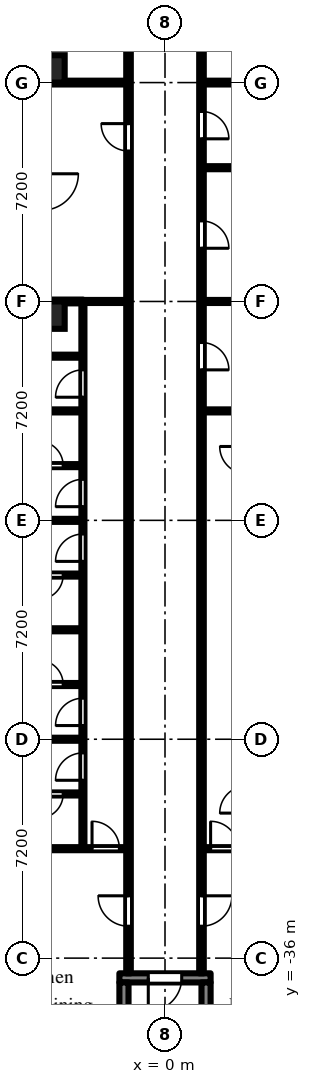
"""IFC4 building model, lengths in metres.
Left out: names, types, materials, properties, quantities, classifications, styles, units other than length and angle.
Written with IfcOpenShell. Run it as: python <this file> out.ifc"""

import sys

from ifc_helpers import new_model, si_unit, direction, frame, frame_2d, origin, origin_2d, place, context, subcontext, project, spatial, rectangle, extrude, element, fill, save


model = new_model("IFC4")
c1 = context("Model", 3, precision=1e-05, world=origin(), true_north=direction((0.0, 1.0)))
c2 = subcontext(c1, "Body", "Model", "MODEL_VIEW")
j1 = project(units=[si_unit("LENGTHUNIT", "METRE"), si_unit("PLANEANGLEUNIT", "RADIAN")], contexts=[c1])
p1 = place(None, origin())
s1 = spatial("IfcSite", under=j1, at=p1, CompositionType="ELEMENT")
p2 = place(p1, origin())
s2 = spatial("IfcBuilding", under=s1, at=p2, CompositionType="ELEMENT")
p3 = place(p2, frame((0.0, 0.0, 11.7)))
s3 = spatial("IfcBuildingStorey", under=s2, at=p3, CompositionType="ELEMENT", Elevation=11.7)
for number, where, z_axis, x_axis in (
    (1, (-3.75, -14.85, 0.0), (0.0, 0.0, 1.0), (1.0, 0.0, 0.0)),
    (2, (-3.75, -6.75, 0.0), (0.0, 0.0, 1.0), (1.0, 0.0, 0.0)),
):
    element("IfcColumn", number, at=place(p3, frame(where, z_axis=z_axis, x_axis=x_axis)), inside=s3, PredefinedType="COLUMN", context=c2, shape_type="SweptSolid", body=[
        extrude(rectangle(XDim=0.9, YDim=0.9, at=origin_2d()), origin(), (0.0, 0.0, 1.0), 3.0),
    ])
p4 = place(p3, frame((-1.5, -36.65, 0.0), z_axis=(0.0, 0.0, 1.0), x_axis=(1.0, 0.0, 0.0)))
e3 = element("IfcWall", 3, at=p4, inside=s3, PredefinedType="SHEAR", context=c2, shape_type="SweptSolid", body=[
    extrude(rectangle(XDim=3.0, YDim=0.3, at=frame_2d((1.5, 0.0))), origin(), (0.0, 0.0, 1.0), 2.575),
])
p5 = place(p4, frame((0.95, 0.0, 0.0)))
e4 = element("IfcOpeningElement", 4, at=p5, cuts=e3, PredefinedType="OPENING", context=c2, shape_type="SweptSolid", body=[
    extrude(rectangle(XDim=1.1, YDim=2.1, at=frame_2d((0.55, 1.05))), frame((0.0, 0.16, 0.0), z_axis=(0.0, -1.0, 0.0), x_axis=(1.0, 0.0, 0.0)), (0.0, 0.0, 1.0), 0.32),
])
for number, where, z_axis, x_axis in (
    (5, (-1.35, -36.8, 0.0), (0.0, 0.0, 1.0), (0.0, -1.0, 0.0)),
    (6, (1.35, -36.8, 0.0), (0.0, 0.0, 1.0), (0.0, -1.0, 0.0)),
):
    element("IfcWall", number, at=place(p3, frame(where, z_axis=z_axis, x_axis=x_axis)), inside=s3, PredefinedType="SHEAR", context=c2, shape_type="SweptSolid", body=[
        extrude(rectangle(XDim=5.8, YDim=0.3, at=frame_2d((2.9, 0.0))), origin(), (0.0, 0.0, 1.0), 2.575),
    ])
p6 = place(p3, frame((-6.9, -32.4, 0.0), z_axis=(0.0, 0.0, 1.0), x_axis=(1.0, 0.0, 0.0)))
e7 = element("IfcWall", 7, at=p6, inside=s3, PredefinedType="PARTITIONING", context=c2, shape_type="SweptSolid", body=[
    extrude(rectangle(XDim=5.625, YDim=0.1, at=frame_2d((2.812, 0.0))), origin(), (0.0, 0.0, 1.0), 2.575),
])
p7 = place(p6, frame((4.5, 0.0, 0.0)))
e8 = element("IfcOpeningElement", 8, at=p7, cuts=e7, PredefinedType="OPENING", context=c2, shape_type="SweptSolid", body=[
    extrude(rectangle(XDim=0.9, YDim=2.1, at=frame_2d((0.45, 1.05))), frame((0.0, 0.06, 0.0), z_axis=(0.0, -1.0, 0.0), x_axis=(1.0, 0.0, 0.0)), (0.0, 0.0, 1.0), 0.12),
])
for number, where, z_axis, x_axis in (
    (9, (-6.9, -28.8, 0.0), (0.0, 0.0, 1.0), (1.0, 0.0, 0.0)),
    (10, (-6.9, -25.2, 0.0), (0.0, 0.0, 1.0), (1.0, 0.0, 0.0)),
    (11, (-6.9, -21.6, 0.0), (0.0, 0.0, 1.0), (1.0, 0.0, 0.0)),
    (12, (-6.9, -18.0, 0.0), (0.0, 0.0, 1.0), (1.0, 0.0, 0.0)),
):
    element("IfcWall", number, at=place(p3, frame(where, z_axis=z_axis, x_axis=x_axis)), inside=s3, PredefinedType="PARTITIONING", context=c2, shape_type="SweptSolid", body=[
        extrude(rectangle(XDim=4.15, YDim=0.1, at=frame_2d((2.075, 0.0))), origin(), (0.0, 0.0, 1.0), 2.575),
    ])
p8 = place(p3, frame((-4.75, -30.6, 0.0), z_axis=(0.0, 0.0, 1.0), x_axis=(1.0, 0.0, 0.0)))
e13 = element("IfcWall", 13, at=p8, inside=s3, PredefinedType="PARTITIONING", context=c2, shape_type="SweptSolid", body=[
    extrude(rectangle(XDim=2.0, YDim=0.1, at=frame_2d((1.0, 0.0))), origin(), (0.0, 0.0, 1.0), 2.575),
])
p9 = place(p8, frame((0.6, 0.0, 0.0)))
e14 = element("IfcOpeningElement", 14, at=p9, cuts=e13, PredefinedType="OPENING", context=c2, shape_type="SweptSolid", body=[
    extrude(rectangle(XDim=0.8, YDim=2.1, at=frame_2d((0.4, 1.05))), frame((0.0, 0.06, 0.0), z_axis=(0.0, -1.0, 0.0), x_axis=(1.0, 0.0, 0.0)), (0.0, 0.0, 1.0), 0.12),
])
p10 = place(p3, frame((-4.75, -27.0, 0.0), z_axis=(0.0, 0.0, 1.0), x_axis=(1.0, 0.0, 0.0)))
e15 = element("IfcWall", 15, at=p10, inside=s3, PredefinedType="PARTITIONING", context=c2, shape_type="SweptSolid", body=[
    extrude(rectangle(XDim=2.0, YDim=0.1, at=frame_2d((1.0, 0.0))), origin(), (0.0, 0.0, 1.0), 2.575),
])
p11 = place(p10, frame((0.6, 0.0, 0.0)))
e16 = element("IfcOpeningElement", 16, at=p11, cuts=e15, PredefinedType="OPENING", context=c2, shape_type="SweptSolid", body=[
    extrude(rectangle(XDim=0.8, YDim=2.1, at=frame_2d((0.4, 1.05))), frame((0.0, 0.06, 0.0), z_axis=(0.0, -1.0, 0.0), x_axis=(1.0, 0.0, 0.0)), (0.0, 0.0, 1.0), 0.12),
])
p12 = place(p3, frame((-4.75, -23.4, 0.0), z_axis=(0.0, 0.0, 1.0), x_axis=(1.0, 0.0, 0.0)))
e17 = element("IfcWall", 17, at=p12, inside=s3, PredefinedType="PARTITIONING", context=c2, shape_type="SweptSolid", body=[
    extrude(rectangle(XDim=2.0, YDim=0.1, at=frame_2d((1.0, 0.0))), origin(), (0.0, 0.0, 1.0), 2.575),
])
p13 = place(p12, frame((0.6, 0.0, 0.0)))
e18 = element("IfcOpeningElement", 18, at=p13, cuts=e17, PredefinedType="OPENING", context=c2, shape_type="SweptSolid", body=[
    extrude(rectangle(XDim=0.8, YDim=2.1, at=frame_2d((0.4, 1.05))), frame((0.0, 0.06, 0.0), z_axis=(0.0, -1.0, 0.0), x_axis=(1.0, 0.0, 0.0)), (0.0, 0.0, 1.0), 0.12),
])
p14 = place(p3, frame((-4.75, -19.8, 0.0), z_axis=(0.0, 0.0, 1.0), x_axis=(1.0, 0.0, 0.0)))
e19 = element("IfcWall", 19, at=p14, inside=s3, PredefinedType="PARTITIONING", context=c2, shape_type="SweptSolid", body=[
    extrude(rectangle(XDim=2.0, YDim=0.1, at=frame_2d((1.0, 0.0))), origin(), (0.0, 0.0, 1.0), 2.575),
])
p15 = place(p14, frame((0.6, 0.0, 0.0)))
e20 = element("IfcOpeningElement", 20, at=p15, cuts=e19, PredefinedType="OPENING", context=c2, shape_type="SweptSolid", body=[
    extrude(rectangle(XDim=0.8, YDim=2.1, at=frame_2d((0.4, 1.05))), frame((0.0, 0.06, 0.0), z_axis=(0.0, -1.0, 0.0), x_axis=(1.0, 0.0, 0.0)), (0.0, 0.0, 1.0), 0.12),
])
p16 = place(p3, frame((-4.75, -16.2, 0.0), z_axis=(0.0, 0.0, 1.0), x_axis=(1.0, 0.0, 0.0)))
e21 = element("IfcWall", 21, at=p16, inside=s3, PredefinedType="PARTITIONING", context=c2, shape_type="SweptSolid", body=[
    extrude(rectangle(XDim=2.0, YDim=0.1, at=frame_2d((1.0, 0.0))), origin(), (0.0, 0.0, 1.0), 2.575),
])
p17 = place(p3, frame((-3.9, -14.4, 0.0), z_axis=(0.0, 0.0, 1.0), x_axis=(1.0, 0.0, 0.0)))
e22 = element("IfcWall", 22, at=p17, inside=s3, PredefinedType="PARTITIONING", context=c2, shape_type="SweptSolid", body=[
    extrude(rectangle(XDim=1.2, YDim=0.125, at=frame_2d((0.6, 0.0))), origin(), (0.0, 0.0, 1.0), 2.575),
])
p18 = place(p3, frame((-3.9, -7.2, 0.0), z_axis=(0.0, 0.0, 1.0), x_axis=(1.0, 0.0, 0.0)))
e23 = element("IfcWall", 23, at=p18, inside=s3, PredefinedType="PARTITIONING", context=c2, shape_type="SweptSolid", body=[
    extrude(rectangle(XDim=2.625, YDim=0.125, at=frame_2d((1.312, 0.0))), origin(), (0.0, 0.0, 1.0), 2.575),
])
p19 = place(p3, frame((-2.7, -32.35, 0.0), z_axis=(0.0, 0.0, 1.0), x_axis=(0.0, 1.0, 0.0)))
e24 = element("IfcWall", 24, at=p19, inside=s3, PredefinedType="PARTITIONING", context=c2, shape_type="SweptSolid", body=[
    extrude(rectangle(XDim=17.888, YDim=0.1, at=frame_2d((8.944, 0.0))), origin(), (0.0, 0.0, 1.0), 2.575),
])
p20 = place(p19, frame((2.2, 0.0, 0.0)))
e25 = element("IfcOpeningElement", 25, at=p20, cuts=e24, PredefinedType="OPENING", context=c2, shape_type="SweptSolid", body=[
    extrude(rectangle(XDim=0.9, YDim=2.1, at=frame_2d((0.45, 1.05))), frame((0.0, 0.06, 0.0), z_axis=(0.0, -1.0, 0.0), x_axis=(1.0, 0.0, 0.0)), (0.0, 0.0, 1.0), 0.12),
])
p21 = place(p19, frame((4.0, 0.0, 0.0)))
e26 = element("IfcOpeningElement", 26, at=p21, cuts=e24, PredefinedType="OPENING", context=c2, shape_type="SweptSolid", body=[
    extrude(rectangle(XDim=0.9, YDim=2.1, at=frame_2d((0.45, 1.05))), frame((0.0, 0.06, 0.0), z_axis=(0.0, -1.0, 0.0), x_axis=(1.0, 0.0, 0.0)), (0.0, 0.0, 1.0), 0.12),
])
p22 = place(p19, frame((9.4, 0.0, 0.0)))
e27 = element("IfcOpeningElement", 27, at=p22, cuts=e24, PredefinedType="OPENING", context=c2, shape_type="SweptSolid", body=[
    extrude(rectangle(XDim=0.9, YDim=2.1, at=frame_2d((0.45, 1.05))), frame((0.0, 0.06, 0.0), z_axis=(0.0, -1.0, 0.0), x_axis=(1.0, 0.0, 0.0)), (0.0, 0.0, 1.0), 0.12),
])
p23 = place(p19, frame((11.2, 0.0, 0.0)))
e28 = element("IfcOpeningElement", 28, at=p23, cuts=e24, PredefinedType="OPENING", context=c2, shape_type="SweptSolid", body=[
    extrude(rectangle(XDim=0.9, YDim=2.1, at=frame_2d((0.45, 1.05))), frame((0.0, 0.06, 0.0), z_axis=(0.0, -1.0, 0.0), x_axis=(1.0, 0.0, 0.0)), (0.0, 0.0, 1.0), 0.12),
])
p24 = place(p19, frame((14.8, 0.0, 0.0)))
e29 = element("IfcOpeningElement", 29, at=p24, cuts=e24, PredefinedType="OPENING", context=c2, shape_type="SweptSolid", body=[
    extrude(rectangle(XDim=0.9, YDim=2.1, at=frame_2d((0.45, 1.05))), frame((0.0, 0.06, 0.0), z_axis=(0.0, -1.0, 0.0), x_axis=(1.0, 0.0, 0.0)), (0.0, 0.0, 1.0), 0.12),
])
p25 = place(p3, frame((-2.7, -14.4, 0.0), z_axis=(0.0, 0.0, 1.0), x_axis=(1.0, 0.0, 0.0)))
e30 = element("IfcWall", 30, at=p25, inside=s3, PredefinedType="PARTITIONING", context=c2, shape_type="SweptSolid", body=[
    extrude(rectangle(XDim=1.425, YDim=0.1, at=frame_2d((0.712, 0.0))), origin(), (0.0, 0.0, 1.0), 2.575),
])
p26 = place(p3, frame((-1.2, -36.5, 0.0), z_axis=(0.0, 0.0, 1.0), x_axis=(0.0, 1.0, 0.0)))
e31 = element("IfcWall", 31, at=p26, inside=s3, PredefinedType="PARTITIONING", context=c2, shape_type="SweptSolid", body=[
    extrude(rectangle(XDim=35.375, YDim=0.15, at=frame_2d((17.688, 0.0))), origin(), (0.0, 0.0, 1.0), 2.575),
])
p27 = place(p26, frame((31.85, 0.0, 0.0)))
e32 = element("IfcOpeningElement", 32, at=p27, cuts=e31, PredefinedType="OPENING", context=c2, shape_type="SweptSolid", body=[
    extrude(rectangle(XDim=0.9, YDim=2.1, at=frame_2d((0.45, 1.05))), frame((0.0, 0.085, 0.0), z_axis=(0.0, -1.0, 0.0), x_axis=(1.0, 0.0, 0.0)), (0.0, 0.0, 1.0), 0.17),
])
p28 = place(p26, frame((27.05, 0.0, 0.0)))
e33 = element("IfcOpeningElement", 33, at=p28, cuts=e31, PredefinedType="OPENING", context=c2, shape_type="SweptSolid", body=[
    extrude(rectangle(XDim=0.9, YDim=2.1, at=frame_2d((0.45, 1.05))), frame((0.0, 0.085, 0.0), z_axis=(0.0, -1.0, 0.0), x_axis=(1.0, 0.0, 0.0)), (0.0, 0.0, 1.0), 0.17),
])
p29 = place(p26, frame((1.55, 0.0, 0.0)))
e34 = element("IfcOpeningElement", 34, at=p29, cuts=e31, PredefinedType="OPENING", context=c2, shape_type="SweptSolid", body=[
    extrude(rectangle(XDim=1.0, YDim=2.1, at=frame_2d((0.5, 1.05))), frame((0.0, 0.085, 0.0), z_axis=(0.0, -1.0, 0.0), x_axis=(1.0, 0.0, 0.0)), (0.0, 0.0, 1.0), 0.17),
])
p30 = place(p3, frame((1.2, -36.5, 0.0), z_axis=(0.0, 0.0, 1.0), x_axis=(0.0, 1.0, 0.0)))
e35 = element("IfcWall", 35, at=p30, inside=s3, PredefinedType="PARTITIONING", context=c2, shape_type="SweptSolid", body=[
    extrude(rectangle(XDim=35.375, YDim=0.15, at=frame_2d((17.688, 0.0))), origin(), (0.0, 0.0, 1.0), 2.575),
])
p31 = place(p30, frame((33.65, 0.0, 0.0)))
e36 = element("IfcOpeningElement", 36, at=p31, cuts=e35, PredefinedType="OPENING", context=c2, shape_type="SweptSolid", body=[
    extrude(rectangle(XDim=0.9, YDim=2.1, at=frame_2d((0.45, 1.05))), frame((0.0, 0.085, 0.0), z_axis=(0.0, -1.0, 0.0), x_axis=(1.0, 0.0, 0.0)), (0.0, 0.0, 1.0), 0.17),
])
p32 = place(p30, frame((30.65, 0.0, 0.0)))
e37 = element("IfcOpeningElement", 37, at=p32, cuts=e35, PredefinedType="OPENING", context=c2, shape_type="SweptSolid", body=[
    extrude(rectangle(XDim=0.9, YDim=2.1, at=frame_2d((0.45, 1.05))), frame((0.0, 0.085, 0.0), z_axis=(0.0, -1.0, 0.0), x_axis=(1.0, 0.0, 0.0)), (0.0, 0.0, 1.0), 0.17),
])
p33 = place(p30, frame((27.45, 0.0, 0.0)))
e38 = element("IfcOpeningElement", 38, at=p33, cuts=e35, PredefinedType="OPENING", context=c2, shape_type="SweptSolid", body=[
    extrude(rectangle(XDim=0.9, YDim=2.1, at=frame_2d((0.45, 1.05))), frame((0.0, 0.085, 0.0), z_axis=(0.0, -1.0, 0.0), x_axis=(1.0, 0.0, 0.0)), (0.0, 0.0, 1.0), 0.17),
])
p34 = place(p30, frame((23.85, 0.0, 0.0)))
e39 = element("IfcOpeningElement", 39, at=p34, cuts=e35, PredefinedType="OPENING", context=c2, shape_type="SweptSolid", body=[
    extrude(rectangle(XDim=0.9, YDim=2.1, at=frame_2d((0.45, 1.05))), frame((0.0, 0.085, 0.0), z_axis=(0.0, -1.0, 0.0), x_axis=(1.0, 0.0, 0.0)), (0.0, 0.0, 1.0), 0.17),
])
p35 = place(p30, frame((19.85, 0.0, 0.0)))
e40 = element("IfcOpeningElement", 40, at=p35, cuts=e35, PredefinedType="OPENING", context=c2, shape_type="SweptSolid", body=[
    extrude(rectangle(XDim=0.9, YDim=2.1, at=frame_2d((0.45, 1.05))), frame((0.0, 0.085, 0.0), z_axis=(0.0, -1.0, 0.0), x_axis=(1.0, 0.0, 0.0)), (0.0, 0.0, 1.0), 0.17),
])
p36 = place(p30, frame((1.55, 0.0, 0.0)))
e41 = element("IfcOpeningElement", 41, at=p36, cuts=e35, PredefinedType="OPENING", context=c2, shape_type="SweptSolid", body=[
    extrude(rectangle(XDim=1.0, YDim=2.1, at=frame_2d((0.5, 1.05))), frame((0.0, 0.085, 0.0), z_axis=(0.0, -1.0, 0.0), x_axis=(1.0, 0.0, 0.0)), (0.0, 0.0, 1.0), 0.17),
])
p37 = place(p3, frame((1.275, -32.4, 0.0), z_axis=(0.0, 0.0, 1.0), x_axis=(1.0, 0.0, 0.0)))
e42 = element("IfcWall", 42, at=p37, inside=s3, PredefinedType="PARTITIONING", context=c2, shape_type="SweptSolid", body=[
    extrude(rectangle(XDim=5.625, YDim=0.1, at=frame_2d((2.812, 0.0))), origin(), (0.0, 0.0, 1.0), 2.575),
])
p38 = place(p37, frame((0.225, 0.0, 0.0)))
e43 = element("IfcOpeningElement", 43, at=p38, cuts=e42, PredefinedType="OPENING", context=c2, shape_type="SweptSolid", body=[
    extrude(rectangle(XDim=0.9, YDim=2.1, at=frame_2d((0.45, 1.05))), frame((0.0, 0.06, 0.0), z_axis=(0.0, -1.0, 0.0), x_axis=(1.0, 0.0, 0.0)), (0.0, 0.0, 1.0), 0.12),
])
p39 = place(p3, frame((1.275, -18.0, 0.0), z_axis=(0.0, 0.0, 1.0), x_axis=(1.0, 0.0, 0.0)))
e44 = element("IfcWall", 44, at=p39, inside=s3, PredefinedType="PARTITIONING", context=c2, shape_type="SweptSolid", body=[
    extrude(rectangle(XDim=5.625, YDim=0.1, at=frame_2d((2.812, 0.0))), origin(), (0.0, 0.0, 1.0), 2.575),
])
for number, where, z_axis, x_axis in (
    (45, (1.275, -14.4, 0.0), (0.0, 0.0, 1.0), (1.0, 0.0, 0.0)),
    (46, (1.275, -10.0, 0.0), (0.0, 0.0, 1.0), (1.0, 0.0, 0.0)),
):
    element("IfcWall", number, at=place(p3, frame(where, z_axis=z_axis, x_axis=x_axis)), inside=s3, PredefinedType="PARTITIONING", context=c2, shape_type="SweptSolid", body=[
        extrude(rectangle(XDim=2.625, YDim=0.1, at=frame_2d((1.312, 0.0))), origin(), (0.0, 0.0, 1.0), 2.575),
    ])
p40 = place(p3, frame((1.275, -7.2, 0.0), z_axis=(0.0, 0.0, 1.0), x_axis=(1.0, 0.0, 0.0)))
e47 = element("IfcWall", 47, at=p40, inside=s3, PredefinedType="PARTITIONING", context=c2, shape_type="SweptSolid", body=[
    extrude(rectangle(XDim=2.625, YDim=0.125, at=frame_2d((1.312, 0.0))), origin(), (0.0, 0.0, 1.0), 2.575),
])
p41 = place(p5, frame((1.1, 0.0, 0.0), z_axis=(0.0, 0.0, 1.0), x_axis=(-1.0, 0.0, 0.0)))
e48 = element("IfcDoor", 48, at=p41, inside=s3, OperationType="SINGLE_SWING_RIGHT", PredefinedType="DOOR", context=c2, shape_type="SweptSolid", body=[
    extrude(rectangle(XDim=1.1, YDim=2.1, at=frame_2d((0.55, 1.05))), frame((0.0, 0.025, 0.0), z_axis=(0.0, -1.0, 0.0), x_axis=(1.0, 0.0, 0.0)), (0.0, 0.0, 1.0), 0.05),
])
fill(e4, e48)
p42 = place(p33, frame((0.9, 0.0, 0.0), z_axis=(0.0, 0.0, 1.0), x_axis=(-1.0, 0.0, 0.0)))
e49 = element("IfcDoor", 49, at=p42, inside=s3, OperationType="SINGLE_SWING_RIGHT", PredefinedType="DOOR", context=c2, shape_type="SweptSolid", body=[
    extrude(rectangle(XDim=0.9, YDim=2.1, at=frame_2d((0.45, 1.05))), frame((0.0, 0.025, 0.0), z_axis=(0.0, -1.0, 0.0), x_axis=(1.0, 0.0, 0.0)), (0.0, 0.0, 1.0), 0.05),
])
fill(e38, e49)
p43 = place(p34, frame((0.9, 0.0, 0.0), z_axis=(0.0, 0.0, 1.0), x_axis=(-1.0, 0.0, 0.0)))
e50 = element("IfcDoor", 50, at=p43, inside=s3, OperationType="SINGLE_SWING_RIGHT", PredefinedType="DOOR", context=c2, shape_type="SweptSolid", body=[
    extrude(rectangle(XDim=0.9, YDim=2.1, at=frame_2d((0.45, 1.05))), frame((0.0, 0.025, 0.0), z_axis=(0.0, -1.0, 0.0), x_axis=(1.0, 0.0, 0.0)), (0.0, 0.0, 1.0), 0.05),
])
fill(e39, e50)
p44 = place(p35, frame((0.9, 0.0, 0.0), z_axis=(0.0, 0.0, 1.0), x_axis=(-1.0, 0.0, 0.0)))
e51 = element("IfcDoor", 51, at=p44, inside=s3, OperationType="SINGLE_SWING_RIGHT", PredefinedType="DOOR", context=c2, shape_type="SweptSolid", body=[
    extrude(rectangle(XDim=0.9, YDim=2.1, at=frame_2d((0.45, 1.05))), frame((0.0, 0.025, 0.0), z_axis=(0.0, -1.0, 0.0), x_axis=(1.0, 0.0, 0.0)), (0.0, 0.0, 1.0), 0.05),
])
fill(e40, e51)
p45 = place(p36, frame((1.0, 0.0, 0.0), z_axis=(0.0, 0.0, 1.0), x_axis=(-1.0, 0.0, 0.0)))
e52 = element("IfcDoor", 52, at=p45, inside=s3, OperationType="SINGLE_SWING_LEFT", PredefinedType="DOOR", context=c2, shape_type="SweptSolid", body=[
    extrude(rectangle(XDim=1.0, YDim=2.1, at=frame_2d((0.5, 1.05))), frame((0.0, 0.025, 0.0), z_axis=(0.0, -1.0, 0.0), x_axis=(1.0, 0.0, 0.0)), (0.0, 0.0, 1.0), 0.05),
])
fill(e41, e52)
p46 = place(p38, origin())
e53 = element("IfcDoor", 53, at=p46, inside=s3, OperationType="SINGLE_SWING_LEFT", PredefinedType="DOOR", context=c2, shape_type="SweptSolid", body=[
    extrude(rectangle(XDim=0.9, YDim=2.1, at=frame_2d((0.45, 1.05))), frame((0.0, 0.025, 0.0), z_axis=(0.0, -1.0, 0.0), x_axis=(1.0, 0.0, 0.0)), (0.0, 0.0, 1.0), 0.05),
])
fill(e43, e53)
p47 = place(p28, origin())
e54 = element("IfcDoor", 54, at=p47, inside=s3, OperationType="SINGLE_SWING_RIGHT", PredefinedType="DOOR", context=c2, shape_type="SweptSolid", body=[
    extrude(rectangle(XDim=0.9, YDim=2.1, at=frame_2d((0.45, 1.05))), frame((0.0, 0.025, 0.0), z_axis=(0.0, -1.0, 0.0), x_axis=(1.0, 0.0, 0.0)), (0.0, 0.0, 1.0), 0.05),
])
fill(e33, e54)
p48 = place(p29, origin())
e55 = element("IfcDoor", 55, at=p48, inside=s3, OperationType="SINGLE_SWING_RIGHT", PredefinedType="DOOR", context=c2, shape_type="SweptSolid", body=[
    extrude(rectangle(XDim=1.0, YDim=2.1, at=frame_2d((0.5, 1.05))), frame((0.0, 0.025, 0.0), z_axis=(0.0, -1.0, 0.0), x_axis=(1.0, 0.0, 0.0)), (0.0, 0.0, 1.0), 0.05),
])
fill(e34, e55)
p49 = place(p20, origin())
e56 = element("IfcDoor", 56, at=p49, inside=s3, OperationType="SINGLE_SWING_LEFT", PredefinedType="DOOR", context=c2, shape_type="SweptSolid", body=[
    extrude(rectangle(XDim=0.9, YDim=2.1, at=frame_2d((0.45, 1.05))), frame((0.0, 0.025, 0.0), z_axis=(0.0, -1.0, 0.0), x_axis=(1.0, 0.0, 0.0)), (0.0, 0.0, 1.0), 0.05),
])
fill(e25, e56)
p50 = place(p21, origin())
e57 = element("IfcDoor", 57, at=p50, inside=s3, OperationType="SINGLE_SWING_LEFT", PredefinedType="DOOR", context=c2, shape_type="SweptSolid", body=[
    extrude(rectangle(XDim=0.9, YDim=2.1, at=frame_2d((0.45, 1.05))), frame((0.0, 0.025, 0.0), z_axis=(0.0, -1.0, 0.0), x_axis=(1.0, 0.0, 0.0)), (0.0, 0.0, 1.0), 0.05),
])
fill(e26, e57)
p51 = place(p22, origin())
e58 = element("IfcDoor", 58, at=p51, inside=s3, OperationType="SINGLE_SWING_LEFT", PredefinedType="DOOR", context=c2, shape_type="SweptSolid", body=[
    extrude(rectangle(XDim=0.9, YDim=2.1, at=frame_2d((0.45, 1.05))), frame((0.0, 0.025, 0.0), z_axis=(0.0, -1.0, 0.0), x_axis=(1.0, 0.0, 0.0)), (0.0, 0.0, 1.0), 0.05),
])
fill(e27, e58)
p52 = place(p23, origin())
e59 = element("IfcDoor", 59, at=p52, inside=s3, OperationType="SINGLE_SWING_LEFT", PredefinedType="DOOR", context=c2, shape_type="SweptSolid", body=[
    extrude(rectangle(XDim=0.9, YDim=2.1, at=frame_2d((0.45, 1.05))), frame((0.0, 0.025, 0.0), z_axis=(0.0, -1.0, 0.0), x_axis=(1.0, 0.0, 0.0)), (0.0, 0.0, 1.0), 0.05),
])
fill(e28, e59)
p53 = place(p24, origin())
e60 = element("IfcDoor", 60, at=p53, inside=s3, OperationType="SINGLE_SWING_LEFT", PredefinedType="DOOR", context=c2, shape_type="SweptSolid", body=[
    extrude(rectangle(XDim=0.9, YDim=2.1, at=frame_2d((0.45, 1.05))), frame((0.0, 0.025, 0.0), z_axis=(0.0, -1.0, 0.0), x_axis=(1.0, 0.0, 0.0)), (0.0, 0.0, 1.0), 0.05),
])
fill(e29, e60)
p54 = place(p7, origin())
e61 = element("IfcDoor", 61, at=p54, inside=s3, OperationType="SINGLE_SWING_LEFT", PredefinedType="DOOR", context=c2, shape_type="SweptSolid", body=[
    extrude(rectangle(XDim=0.9, YDim=2.1, at=frame_2d((0.45, 1.05))), frame((0.0, 0.025, 0.0), z_axis=(0.0, -1.0, 0.0), x_axis=(1.0, 0.0, 0.0)), (0.0, 0.0, 1.0), 0.05),
])
fill(e8, e61)
p55 = place(p15, origin())
e62 = element("IfcDoor", 62, at=p55, inside=s3, OperationType="SINGLE_SWING_LEFT", PredefinedType="DOOR", context=c2, shape_type="SweptSolid", body=[
    extrude(rectangle(XDim=0.8, YDim=2.1, at=frame_2d((0.4, 1.05))), frame((0.0, 0.025, 0.0), z_axis=(0.0, -1.0, 0.0), x_axis=(1.0, 0.0, 0.0)), (0.0, 0.0, 1.0), 0.05),
])
fill(e20, e62)
p56 = place(p13, frame((0.8, 0.0, 0.0), z_axis=(0.0, 0.0, 1.0), x_axis=(-1.0, 0.0, 0.0)))
e63 = element("IfcDoor", 63, at=p56, inside=s3, OperationType="SINGLE_SWING_RIGHT", PredefinedType="DOOR", context=c2, shape_type="SweptSolid", body=[
    extrude(rectangle(XDim=0.8, YDim=2.1, at=frame_2d((0.4, 1.05))), frame((0.0, 0.025, 0.0), z_axis=(0.0, -1.0, 0.0), x_axis=(1.0, 0.0, 0.0)), (0.0, 0.0, 1.0), 0.05),
])
fill(e18, e63)
p57 = place(p11, origin())
e64 = element("IfcDoor", 64, at=p57, inside=s3, OperationType="SINGLE_SWING_LEFT", PredefinedType="DOOR", context=c2, shape_type="SweptSolid", body=[
    extrude(rectangle(XDim=0.8, YDim=2.1, at=frame_2d((0.4, 1.05))), frame((0.0, 0.025, 0.0), z_axis=(0.0, -1.0, 0.0), x_axis=(1.0, 0.0, 0.0)), (0.0, 0.0, 1.0), 0.05),
])
fill(e16, e64)
p58 = place(p9, frame((0.8, 0.0, 0.0), z_axis=(0.0, 0.0, 1.0), x_axis=(-1.0, 0.0, 0.0)))
e65 = element("IfcDoor", 65, at=p58, inside=s3, OperationType="SINGLE_SWING_RIGHT", PredefinedType="DOOR", context=c2, shape_type="SweptSolid", body=[
    extrude(rectangle(XDim=0.8, YDim=2.1, at=frame_2d((0.4, 1.05))), frame((0.0, 0.025, 0.0), z_axis=(0.0, -1.0, 0.0), x_axis=(1.0, 0.0, 0.0)), (0.0, 0.0, 1.0), 0.05),
])
fill(e14, e65)
save(model, sys.argv[1])
